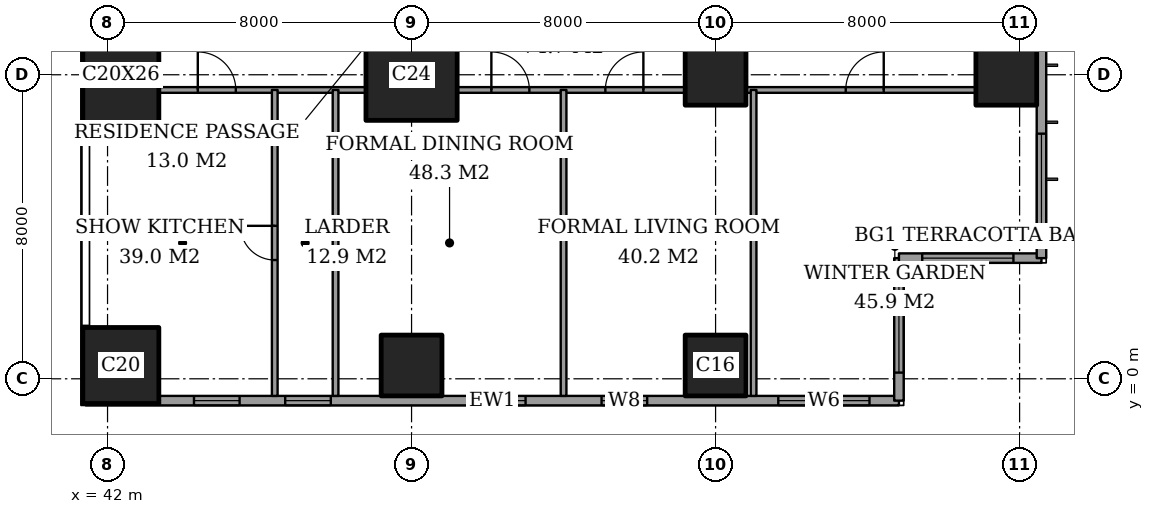
"""IFC4 building model, lengths in metres.
Left out: names, types, materials, properties, quantities, classifications, styles, units other than length and angle.
Written with IfcOpenShell. Run it as: python <this file> out.ifc"""

import sys

from ifc_helpers import new_model, si_unit, direction, frame, frame_2d, origin, origin_2d, place, context, subcontext, project, spatial, rectangle, extrude, element, fill, save


model = new_model("IFC4")
c1 = context("Model", 3, precision=1e-05, world=origin(), true_north=direction((0.0, 1.0)))
c2 = subcontext(c1, "Body", "Model", "MODEL_VIEW")
j1 = project(units=[si_unit("LENGTHUNIT", "METRE"), si_unit("PLANEANGLEUNIT", "RADIAN")], contexts=[c1])
p1 = place(None, origin())
s1 = spatial("IfcSite", under=j1, at=p1, CompositionType="ELEMENT")
p2 = place(p1, origin())
s2 = spatial("IfcBuilding", under=s1, at=p2, CompositionType="ELEMENT")
p3 = place(p2, frame((0.0, 0.0, 262.8)))
s3 = spatial("IfcBuildingStorey", under=s2, at=p3, CompositionType="ELEMENT", Elevation=262.8)
p4 = place(p3, frame((42.35, 0.35, 0.0), z_axis=(0.0, 0.0, 1.0), x_axis=(1.0, 0.0, 0.0)))
e1 = element("IfcColumn", 1, at=p4, inside=s3, PredefinedType="COLUMN", context=c2, shape_type="SweptSolid", body=[
    extrude(rectangle(XDim=2.0, YDim=2.0, at=origin_2d()), origin(), (0.0, 0.0, 1.0), 3.6),
])
p5 = place(p3, frame((42.35, 8.0, 0.0), z_axis=(0.0, 0.0, 1.0), x_axis=(1.0, 0.0, 0.0)))
e2 = element("IfcColumn", 2, at=p5, inside=s3, PredefinedType="COLUMN", context=c2, shape_type="SweptSolid", body=[
    extrude(rectangle(XDim=2.0, YDim=2.6, at=origin_2d()), origin(), (0.0, 0.0, 1.0), 3.6),
])
p6 = place(p3, frame((50.0, 0.35, 0.0), z_axis=(0.0, 0.0, 1.0), x_axis=(1.0, 0.0, 0.0)))
e3 = element("IfcColumn", 3, at=p6, inside=s3, PredefinedType="COLUMN", context=c2, shape_type="SweptSolid", body=[
    extrude(rectangle(XDim=1.6, YDim=1.6, at=origin_2d()), origin(), (0.0, 0.0, 1.0), 3.6),
])
p7 = place(p3, frame((50.0, 8.0, 0.0), z_axis=(0.0, 0.0, 1.0), x_axis=(1.0, 0.0, 0.0)))
e4 = element("IfcColumn", 4, at=p7, inside=s3, PredefinedType="COLUMN", context=c2, shape_type="SweptSolid", body=[
    extrude(rectangle(XDim=2.4, YDim=2.4, at=origin_2d()), origin(), (0.0, 0.0, 1.0), 3.6),
])
for number, where, z_axis, x_axis in (
    (5, (58.0, 0.35, 0.0), (0.0, 0.0, 1.0), (1.0, 0.0, 0.0)),
    (6, (58.0, 8.0, 0.0), (0.0, 0.0, 1.0), (1.0, 0.0, 0.0)),
    (7, (65.65, 8.0, 0.0), (0.0, 0.0, 1.0), (1.0, 0.0, 0.0)),
):
    element("IfcColumn", number, at=place(p3, frame(where, z_axis=z_axis, x_axis=x_axis)), inside=s3, PredefinedType="COLUMN", context=c2, shape_type="SweptSolid", body=[
        extrude(rectangle(XDim=1.6, YDim=1.6, at=origin_2d()), origin(), (0.0, 0.0, 1.0), 3.6),
    ])
p8 = place(p3, frame((41.425, -0.575, 0.0), z_axis=(0.0, 0.0, 1.0), x_axis=(1.0, 0.0, 0.0)))
e8 = element("IfcWall", 8, at=p8, inside=s3, PredefinedType="SOLIDWALL", context=c2, shape_type="SweptSolid", body=[
    extrude(rectangle(XDim=21.4, YDim=0.25, at=frame_2d((10.7, 0.0))), origin(), (0.0, 0.0, 1.0), 3.6),
])
p9 = place(p8, frame((2.85, 0.0, 0.6)))
e9 = element("IfcOpeningElement", 9, at=p9, cuts=e8, PredefinedType="OPENING", context=c2, shape_type="SweptSolid", body=[
    extrude(rectangle(XDim=1.2, YDim=2.0, at=frame_2d((0.6, 1.0))), frame((0.0, 0.135, 0.0), z_axis=(0.0, -1.0, 0.0), x_axis=(1.0, 0.0, 0.0)), (0.0, 0.0, 1.0), 0.27),
])
p10 = place(p8, frame((5.25, 0.0, 0.6)))
e10 = element("IfcOpeningElement", 10, at=p10, cuts=e8, PredefinedType="OPENING", context=c2, shape_type="SweptSolid", body=[
    extrude(rectangle(XDim=1.2, YDim=2.0, at=frame_2d((0.6, 1.0))), frame((0.0, 0.135, 0.0), z_axis=(0.0, -1.0, 0.0), x_axis=(1.0, 0.0, 0.0)), (0.0, 0.0, 1.0), 0.27),
])
p11 = place(p8, frame((10.375, 0.0, 0.6)))
e11 = element("IfcOpeningElement", 11, at=p11, cuts=e8, PredefinedType="OPENING", context=c2, shape_type="SweptSolid", body=[
    extrude(rectangle(XDim=1.2, YDim=2.0, at=frame_2d((0.6, 1.0))), frame((0.0, 0.135, 0.0), z_axis=(0.0, -1.0, 0.0), x_axis=(1.0, 0.0, 0.0)), (0.0, 0.0, 1.0), 0.27),
])
p12 = place(p8, frame((13.575, 0.0, 0.6)))
e12 = element("IfcOpeningElement", 12, at=p12, cuts=e8, PredefinedType="OPENING", context=c2, shape_type="SweptSolid", body=[
    extrude(rectangle(XDim=1.2, YDim=2.0, at=frame_2d((0.6, 1.0))), frame((0.0, 0.135, 0.0), z_axis=(0.0, -1.0, 0.0), x_axis=(1.0, 0.0, 0.0)), (0.0, 0.0, 1.0), 0.27),
])
p13 = place(p8, frame((18.225, 0.0, 0.6)))
e13 = element("IfcOpeningElement", 13, at=p13, cuts=e8, PredefinedType="OPENING", context=c2, shape_type="SweptSolid", body=[
    extrude(rectangle(XDim=2.4, YDim=2.0, at=frame_2d((1.2, 1.0))), frame((0.0, 0.135, 0.0), z_axis=(0.0, -1.0, 0.0), x_axis=(1.0, 0.0, 0.0)), (0.0, 0.0, 1.0), 0.27),
])
p14 = place(p3, frame((62.825, -0.575, 0.0), z_axis=(0.0, 0.0, 1.0), x_axis=(0.0, 1.0, 0.0)))
e14 = element("IfcWall", 14, at=p14, inside=s3, PredefinedType="SOLIDWALL", context=c2, shape_type="SweptSolid", body=[
    extrude(rectangle(XDim=3.75, YDim=0.25, at=frame_2d((1.875, 0.0))), origin(), (0.0, 0.0, 1.0), 3.6),
])
p15 = place(p14, frame((0.738, 0.0, 0.6)))
e15 = element("IfcOpeningElement", 15, at=p15, cuts=e14, PredefinedType="OPENING", context=c2, shape_type="SweptSolid", body=[
    extrude(rectangle(XDim=2.4, YDim=2.0, at=frame_2d((1.2, 1.0))), frame((0.0, 0.135, 0.0), z_axis=(0.0, -1.0, 0.0), x_axis=(1.0, 0.0, 0.0)), (0.0, 0.0, 1.0), 0.27),
])
p16 = place(p3, frame((62.825, 3.175, 0.0), z_axis=(0.0, 0.0, 1.0), x_axis=(1.0, 0.0, 0.0)))
e16 = element("IfcWall", 16, at=p16, inside=s3, PredefinedType="SOLIDWALL", context=c2, shape_type="SweptSolid", body=[
    extrude(rectangle(XDim=3.75, YDim=0.25, at=frame_2d((1.875, 0.0))), origin(), (0.0, 0.0, 1.0), 3.6),
])
p17 = place(p16, frame((0.613, 0.0, 0.6)))
e17 = element("IfcOpeningElement", 17, at=p17, cuts=e16, PredefinedType="OPENING", context=c2, shape_type="SweptSolid", body=[
    extrude(rectangle(XDim=2.4, YDim=2.0, at=frame_2d((1.2, 1.0))), frame((0.0, 0.135, 0.0), z_axis=(0.0, -1.0, 0.0), x_axis=(1.0, 0.0, 0.0)), (0.0, 0.0, 1.0), 0.27),
])
p18 = place(p3, frame((66.575, 3.175, 0.0), z_axis=(0.0, 0.0, 1.0), x_axis=(0.0, 1.0, 0.0)))
e18 = element("IfcWall", 18, at=p18, inside=s3, PredefinedType="SOLIDWALL", context=c2, shape_type="SweptSolid", body=[
    extrude(rectangle(XDim=41.65, YDim=0.25, at=frame_2d((20.825, 0.0))), origin(), (0.0, 0.0, 1.0), 3.6),
])
p19 = place(p18, frame((0.875, 0.0, 0.6)))
e19 = element("IfcOpeningElement", 19, at=p19, cuts=e18, PredefinedType="OPENING", context=c2, shape_type="SweptSolid", body=[
    extrude(rectangle(XDim=2.4, YDim=2.0, at=frame_2d((1.2, 1.0))), frame((0.0, 0.135, 0.0), z_axis=(0.0, -1.0, 0.0), x_axis=(1.0, 0.0, 0.0)), (0.0, 0.0, 1.0), 0.27),
])
p20 = place(p18, frame((6.0, 0.0, 0.6)))
e20 = element("IfcOpeningElement", 20, at=p20, cuts=e18, PredefinedType="OPENING", context=c2, shape_type="SweptSolid", body=[
    extrude(rectangle(XDim=1.2, YDim=2.0, at=frame_2d((0.6, 1.0))), frame((0.0, 0.135, 0.0), z_axis=(0.0, -1.0, 0.0), x_axis=(1.0, 0.0, 0.0)), (0.0, 0.0, 1.0), 0.27),
])
p21 = place(p18, frame((8.525, 0.0, 0.6)))
e21 = element("IfcOpeningElement", 21, at=p21, cuts=e18, PredefinedType="OPENING", context=c2, shape_type="SweptSolid", body=[
    extrude(rectangle(XDim=2.4, YDim=2.0, at=frame_2d((1.2, 1.0))), frame((0.0, 0.135, 0.0), z_axis=(0.0, -1.0, 0.0), x_axis=(1.0, 0.0, 0.0)), (0.0, 0.0, 1.0), 0.27),
])
p22 = place(p18, frame((15.625, 0.0, 0.6)))
e22 = element("IfcOpeningElement", 22, at=p22, cuts=e18, PredefinedType="OPENING", context=c2, shape_type="SweptSolid", body=[
    extrude(rectangle(XDim=2.4, YDim=2.0, at=frame_2d((1.2, 1.0))), frame((0.0, 0.135, 0.0), z_axis=(0.0, -1.0, 0.0), x_axis=(1.0, 0.0, 0.0)), (0.0, 0.0, 1.0), 0.27),
])
p23 = place(p18, frame((23.525, 0.0, 0.6)))
e23 = element("IfcOpeningElement", 23, at=p23, cuts=e18, PredefinedType="OPENING", context=c2, shape_type="SweptSolid", body=[
    extrude(rectangle(XDim=2.4, YDim=2.0, at=frame_2d((1.2, 1.0))), frame((0.0, 0.135, 0.0), z_axis=(0.0, -1.0, 0.0), x_axis=(1.0, 0.0, 0.0)), (0.0, 0.0, 1.0), 0.27),
])
p24 = place(p18, frame((30.625, 0.0, 0.6)))
e24 = element("IfcOpeningElement", 24, at=p24, cuts=e18, PredefinedType="OPENING", context=c2, shape_type="SweptSolid", body=[
    extrude(rectangle(XDim=2.4, YDim=2.0, at=frame_2d((1.2, 1.0))), frame((0.0, 0.135, 0.0), z_axis=(0.0, -1.0, 0.0), x_axis=(1.0, 0.0, 0.0)), (0.0, 0.0, 1.0), 0.27),
])
p25 = place(p18, frame((34.325, 0.0, 0.6)))
e25 = element("IfcOpeningElement", 25, at=p25, cuts=e18, PredefinedType="OPENING", context=c2, shape_type="SweptSolid", body=[
    extrude(rectangle(XDim=1.2, YDim=2.0, at=frame_2d((0.6, 1.0))), frame((0.0, 0.135, 0.0), z_axis=(0.0, -1.0, 0.0), x_axis=(1.0, 0.0, 0.0)), (0.0, 0.0, 1.0), 0.27),
])
p26 = place(p18, frame((38.375, 0.0, 0.6)))
e26 = element("IfcOpeningElement", 26, at=p26, cuts=e18, PredefinedType="OPENING", context=c2, shape_type="SweptSolid", body=[
    extrude(rectangle(XDim=2.4, YDim=2.0, at=frame_2d((1.2, 1.0))), frame((0.0, 0.135, 0.0), z_axis=(0.0, -1.0, 0.0), x_axis=(1.0, 0.0, 0.0)), (0.0, 0.0, 1.0), 0.27),
])
p27 = place(p3, frame((43.35, 7.6, 0.0), z_axis=(0.0, 0.0, 1.0), x_axis=(1.0, 0.0, 0.0)))
e27 = element("IfcWall", 27, at=p27, inside=s3, PredefinedType="PARTITIONING", context=c2, shape_type="SweptSolid", body=[
    extrude(rectangle(XDim=5.45, YDim=0.15, at=frame_2d((2.725, 0.0))), origin(), (0.0, 0.0, 1.0), 3.35),
])
p28 = place(p27, frame((1.025, 0.0, 0.0)))
e28 = element("IfcOpeningElement", 28, at=p28, cuts=e27, PredefinedType="OPENING", context=c2, shape_type="SweptSolid", body=[
    extrude(rectangle(XDim=1.0, YDim=2.1, at=frame_2d((0.5, 1.05))), frame((0.0, 0.085, 0.0), z_axis=(0.0, -1.0, 0.0), x_axis=(1.0, 0.0, 0.0)), (0.0, 0.0, 1.0), 0.17),
])
p29 = place(p3, frame((51.2, 7.6, 0.0), z_axis=(0.0, 0.0, 1.0), x_axis=(1.0, 0.0, 0.0)))
e29 = element("IfcWall", 29, at=p29, inside=s3, PredefinedType="PARTITIONING", context=c2, shape_type="SweptSolid", body=[
    extrude(rectangle(XDim=6.0, YDim=0.15, at=frame_2d((3.0, 0.0))), origin(), (0.0, 0.0, 1.0), 3.35),
])
p30 = place(p29, frame((3.9, 0.0, 0.0)))
e30 = element("IfcOpeningElement", 30, at=p30, cuts=e29, PredefinedType="OPENING", context=c2, shape_type="SweptSolid", body=[
    extrude(rectangle(XDim=1.0, YDim=2.1, at=frame_2d((0.5, 1.05))), frame((0.0, 0.085, 0.0), z_axis=(0.0, -1.0, 0.0), x_axis=(1.0, 0.0, 0.0)), (0.0, 0.0, 1.0), 0.17),
])
p31 = place(p29, frame((0.9, 0.0, 0.0)))
e31 = element("IfcOpeningElement", 31, at=p31, cuts=e29, PredefinedType="OPENING", context=c2, shape_type="SweptSolid", body=[
    extrude(rectangle(XDim=1.0, YDim=2.1, at=frame_2d((0.5, 1.05))), frame((0.0, 0.085, 0.0), z_axis=(0.0, -1.0, 0.0), x_axis=(1.0, 0.0, 0.0)), (0.0, 0.0, 1.0), 0.17),
])
p32 = place(p3, frame((58.8, 7.6, 0.0), z_axis=(0.0, 0.0, 1.0), x_axis=(1.0, 0.0, 0.0)))
e32 = element("IfcWall", 32, at=p32, inside=s3, PredefinedType="PARTITIONING", context=c2, shape_type="SweptSolid", body=[
    extrude(rectangle(XDim=6.05, YDim=0.15, at=frame_2d((3.025, 0.0))), origin(), (0.0, 0.0, 1.0), 3.35),
])
p33 = place(p32, frame((2.625, 0.0, 0.0)))
e33 = element("IfcOpeningElement", 33, at=p33, cuts=e32, PredefinedType="OPENING", context=c2, shape_type="SweptSolid", body=[
    extrude(rectangle(XDim=1.0, YDim=2.1, at=frame_2d((0.5, 1.05))), frame((0.0, 0.085, 0.0), z_axis=(0.0, -1.0, 0.0), x_axis=(1.0, 0.0, 0.0)), (0.0, 0.0, 1.0), 0.17),
])
p34 = place(p3, frame((46.4, -0.45, 0.0), z_axis=(0.0, 0.0, 1.0), x_axis=(0.0, 1.0, 0.0)))
e34 = element("IfcWall", 34, at=p34, inside=s3, PredefinedType="PARTITIONING", context=c2, shape_type="SweptSolid", body=[
    extrude(rectangle(XDim=8.05, YDim=0.15, at=frame_2d((4.025, 0.0))), origin(), (0.0, 0.0, 1.0), 3.35),
])
p35 = place(p34, frame((3.575, 0.0, 0.0)))
e35 = element("IfcOpeningElement", 35, at=p35, cuts=e34, PredefinedType="OPENING", context=c2, shape_type="SweptSolid", body=[
    extrude(rectangle(XDim=0.9, YDim=2.1, at=frame_2d((0.45, 1.05))), frame((0.0, 0.085, 0.0), z_axis=(0.0, -1.0, 0.0), x_axis=(1.0, 0.0, 0.0)), (0.0, 0.0, 1.0), 0.17),
])
for number, where, z_axis, x_axis in (
    (36, (48.0, -0.45, 0.0), (0.0, 0.0, 1.0), (0.0, 1.0, 0.0)),
    (37, (54.0, -0.45, 0.0), (0.0, 0.0, 1.0), (0.0, 1.0, 0.0)),
    (38, (59.0, -0.45, 0.0), (0.0, 0.0, 1.0), (0.0, 1.0, 0.0)),
):
    element("IfcWall", number, at=place(p3, frame(where, z_axis=z_axis, x_axis=x_axis)), inside=s3, PredefinedType="PARTITIONING", context=c2, shape_type="SweptSolid", body=[
        extrude(rectangle(XDim=8.05, YDim=0.15, at=frame_2d((4.025, 0.0))), origin(), (0.0, 0.0, 1.0), 3.35),
    ])
p36 = place(p9, origin())
e39 = element("IfcWindow", 39, at=p36, inside=s3, PartitioningType="SINGLE_PANEL", PredefinedType="WINDOW", context=c2, shape_type="SweptSolid", body=[
    extrude(rectangle(XDim=1.2, YDim=2.0, at=frame_2d((0.6, 1.0))), frame((0.0, 0.03, 0.0), z_axis=(0.0, -1.0, 0.0), x_axis=(1.0, 0.0, 0.0)), (0.0, 0.0, 1.0), 0.06),
])
fill(e9, e39)
p37 = place(p10, origin())
e40 = element("IfcWindow", 40, at=p37, inside=s3, PartitioningType="SINGLE_PANEL", PredefinedType="WINDOW", context=c2, shape_type="SweptSolid", body=[
    extrude(rectangle(XDim=1.2, YDim=2.0, at=frame_2d((0.6, 1.0))), frame((0.0, 0.03, 0.0), z_axis=(0.0, -1.0, 0.0), x_axis=(1.0, 0.0, 0.0)), (0.0, 0.0, 1.0), 0.06),
])
fill(e10, e40)
p38 = place(p11, origin())
e41 = element("IfcWindow", 41, at=p38, inside=s3, PartitioningType="SINGLE_PANEL", PredefinedType="WINDOW", context=c2, shape_type="SweptSolid", body=[
    extrude(rectangle(XDim=1.2, YDim=2.0, at=frame_2d((0.6, 1.0))), frame((0.0, 0.03, 0.0), z_axis=(0.0, -1.0, 0.0), x_axis=(1.0, 0.0, 0.0)), (0.0, 0.0, 1.0), 0.06),
])
fill(e11, e41)
p39 = place(p12, origin())
e42 = element("IfcWindow", 42, at=p39, inside=s3, PartitioningType="SINGLE_PANEL", PredefinedType="WINDOW", context=c2, shape_type="SweptSolid", body=[
    extrude(rectangle(XDim=1.2, YDim=2.0, at=frame_2d((0.6, 1.0))), frame((0.0, 0.03, 0.0), z_axis=(0.0, -1.0, 0.0), x_axis=(1.0, 0.0, 0.0)), (0.0, 0.0, 1.0), 0.06),
])
fill(e12, e42)
p40 = place(p13, origin())
e43 = element("IfcWindow", 43, at=p40, inside=s3, PartitioningType="SINGLE_PANEL", PredefinedType="WINDOW", context=c2, shape_type="SweptSolid", body=[
    extrude(rectangle(XDim=2.4, YDim=2.0, at=frame_2d((1.2, 1.0))), frame((0.0, 0.03, 0.0), z_axis=(0.0, -1.0, 0.0), x_axis=(1.0, 0.0, 0.0)), (0.0, 0.0, 1.0), 0.06),
])
fill(e13, e43)
p41 = place(p15, origin())
e44 = element("IfcWindow", 44, at=p41, inside=s3, PartitioningType="SINGLE_PANEL", PredefinedType="WINDOW", context=c2, shape_type="SweptSolid", body=[
    extrude(rectangle(XDim=2.4, YDim=2.0, at=frame_2d((1.2, 1.0))), frame((0.0, 0.03, 0.0), z_axis=(0.0, -1.0, 0.0), x_axis=(1.0, 0.0, 0.0)), (0.0, 0.0, 1.0), 0.06),
])
fill(e15, e44)
p42 = place(p17, origin())
e45 = element("IfcWindow", 45, at=p42, inside=s3, PartitioningType="SINGLE_PANEL", PredefinedType="WINDOW", context=c2, shape_type="SweptSolid", body=[
    extrude(rectangle(XDim=2.4, YDim=2.0, at=frame_2d((1.2, 1.0))), frame((0.0, 0.03, 0.0), z_axis=(0.0, -1.0, 0.0), x_axis=(1.0, 0.0, 0.0)), (0.0, 0.0, 1.0), 0.06),
])
fill(e17, e45)
p43 = place(p19, origin())
e46 = element("IfcWindow", 46, at=p43, inside=s3, PartitioningType="SINGLE_PANEL", PredefinedType="WINDOW", context=c2, shape_type="SweptSolid", body=[
    extrude(rectangle(XDim=2.4, YDim=2.0, at=frame_2d((1.2, 1.0))), frame((0.0, 0.03, 0.0), z_axis=(0.0, -1.0, 0.0), x_axis=(1.0, 0.0, 0.0)), (0.0, 0.0, 1.0), 0.06),
])
fill(e19, e46)
p44 = place(p33, origin())
e47 = element("IfcDoor", 47, at=p44, inside=s3, OperationType="SINGLE_SWING_LEFT", PredefinedType="DOOR", context=c2, shape_type="SweptSolid", body=[
    extrude(rectangle(XDim=1.0, YDim=2.1, at=frame_2d((0.5, 1.05))), frame((0.0, 0.025, 0.0), z_axis=(0.0, -1.0, 0.0), x_axis=(1.0, 0.0, 0.0)), (0.0, 0.0, 1.0), 0.05),
])
fill(e33, e47)
p45 = place(p30, origin())
e48 = element("IfcDoor", 48, at=p45, inside=s3, OperationType="SINGLE_SWING_LEFT", PredefinedType="DOOR", context=c2, shape_type="SweptSolid", body=[
    extrude(rectangle(XDim=1.0, YDim=2.1, at=frame_2d((0.5, 1.05))), frame((0.0, 0.025, 0.0), z_axis=(0.0, -1.0, 0.0), x_axis=(1.0, 0.0, 0.0)), (0.0, 0.0, 1.0), 0.05),
])
fill(e30, e48)
p46 = place(p31, origin())
e49 = element("IfcDoor", 49, at=p46, inside=s3, OperationType="SINGLE_SWING_RIGHT", PredefinedType="DOOR", context=c2, shape_type="SweptSolid", body=[
    extrude(rectangle(XDim=1.0, YDim=2.1, at=frame_2d((0.5, 1.05))), frame((0.0, 0.025, 0.0), z_axis=(0.0, -1.0, 0.0), x_axis=(1.0, 0.0, 0.0)), (0.0, 0.0, 1.0), 0.05),
])
fill(e31, e49)
p47 = place(p35, origin())
e50 = element("IfcDoor", 50, at=p47, inside=s3, OperationType="SINGLE_SWING_LEFT", PredefinedType="DOOR", context=c2, shape_type="SweptSolid", body=[
    extrude(rectangle(XDim=0.9, YDim=2.1, at=frame_2d((0.45, 1.05))), frame((0.0, 0.025, 0.0), z_axis=(0.0, -1.0, 0.0), x_axis=(1.0, 0.0, 0.0)), (0.0, 0.0, 1.0), 0.05),
])
fill(e35, e50)
p48 = place(p28, origin())
e51 = element("IfcDoor", 51, at=p48, inside=s3, OperationType="SINGLE_SWING_RIGHT", PredefinedType="DOOR", context=c2, shape_type="SweptSolid", body=[
    extrude(rectangle(XDim=1.0, YDim=2.1, at=frame_2d((0.5, 1.05))), frame((0.0, 0.025, 0.0), z_axis=(0.0, -1.0, 0.0), x_axis=(1.0, 0.0, 0.0)), (0.0, 0.0, 1.0), 0.05),
])
fill(e28, e51)
save(model, sys.argv[1])
